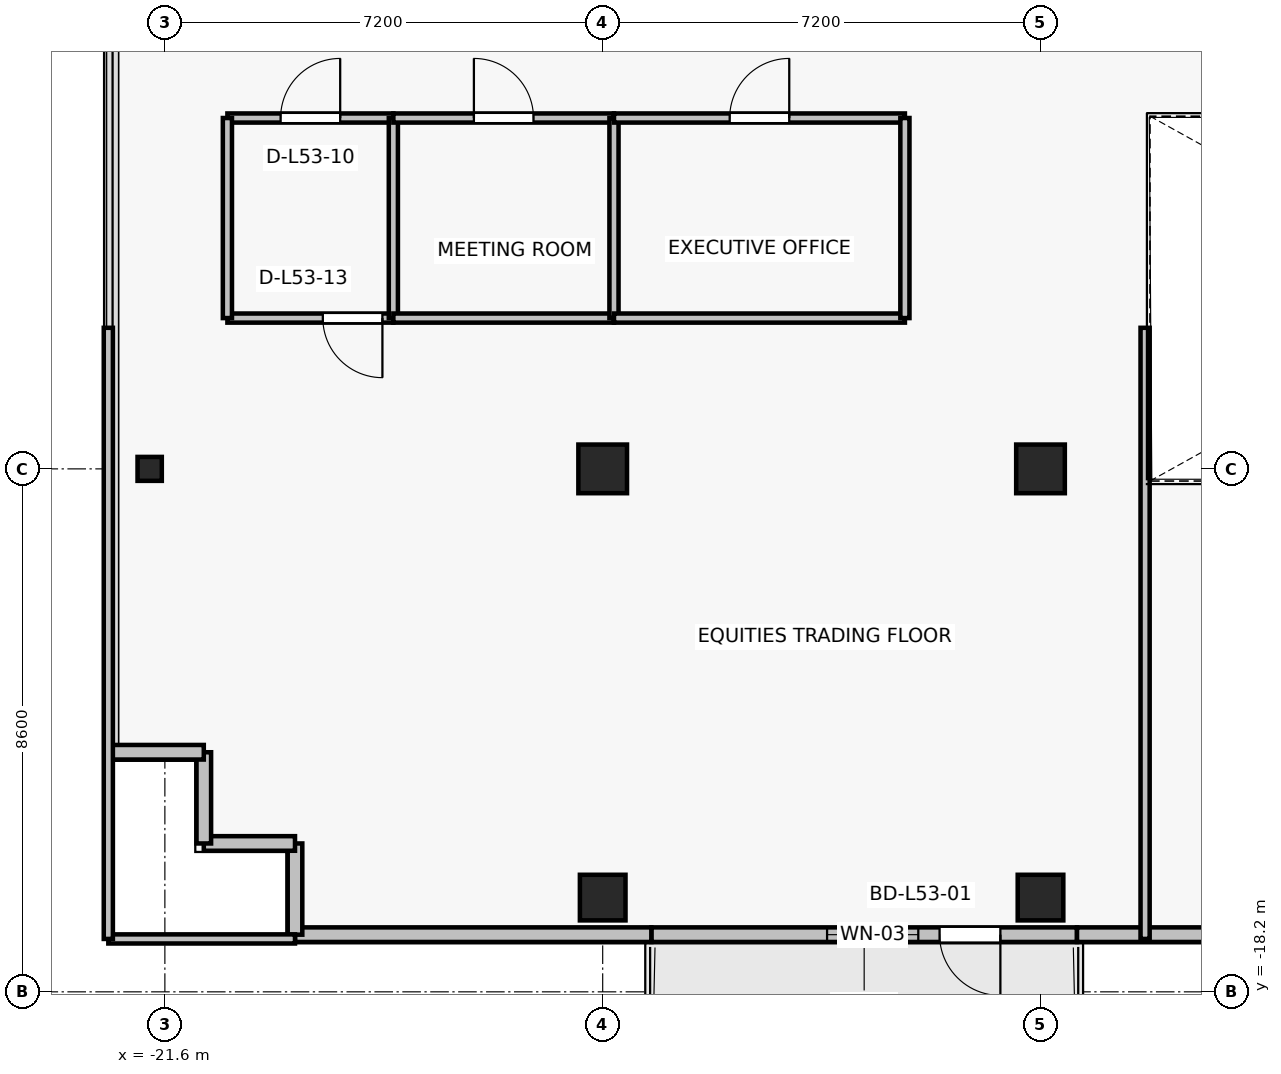
"""IFC4 building model, lengths in metres.
Left out: names, types, materials, properties, quantities, classifications, styles, units other than length and angle.
Written with IfcOpenShell. Run it as: python <this file> out.ifc"""

import sys

from ifc_helpers import new_model, si_unit, direction, frame, frame_2d, origin, origin_2d, place, context, subcontext, project, spatial, rectangle, i_section, extrude, source, transform, mapped, element, fill, save


model = new_model("IFC4")
c1 = context("Model", 3, precision=1e-05, world=origin(), true_north=direction((0.0, 1.0)))
c2 = subcontext(c1, "Body", "Model", "MODEL_VIEW")
j1 = project(units=[si_unit("LENGTHUNIT", "METRE"), si_unit("PLANEANGLEUNIT", "RADIAN")], contexts=[c1])
p1 = place(None, origin())
s1 = spatial("IfcSite", under=j1, at=p1, CompositionType="ELEMENT")
p2 = place(p1, origin())
s2 = spatial("IfcBuilding", under=s1, at=p2, CompositionType="ELEMENT")
p3 = place(p2, frame((0.0, 0.0, 189.1)))
s3 = spatial("IfcBuildingStorey", under=s2, at=p3, CompositionType="ELEMENT", Elevation=189.1)
for number, where, z_axis, x_axis in (
    (1, (-14.4, -9.6, 0.0), (0.0, 0.0, 1.0), (1.0, 0.0, 0.0)),
    (2, (-7.2, -9.6, 0.0), (0.0, 0.0, 1.0), (1.0, 0.0, 0.0)),
):
    element("IfcColumn", number, at=place(p3, frame(where, z_axis=z_axis, x_axis=x_axis)), inside=s3, PredefinedType="COLUMN", context=c2, shape_type="SweptSolid", body=[
        extrude(rectangle(XDim=0.8, YDim=0.8, at=origin_2d()), origin(), (0.0, 0.0, 1.0), 3.3),
    ])
for number, where, z_axis, x_axis in (
    (3, (-14.4, -16.65, 0.0), (0.0, 0.0, 1.0), (1.0, 0.0, 0.0)),
    (4, (-7.2, -16.65, 0.0), (0.0, 0.0, 1.0), (1.0, 0.0, 0.0)),
):
    element("IfcColumn", number, at=place(p3, frame(where, z_axis=z_axis, x_axis=x_axis)), inside=s3, PredefinedType="COLUMN", context=c2, shape_type="SweptSolid", body=[
        extrude(rectangle(XDim=0.75, YDim=0.75, at=origin_2d()), origin(), (0.0, 0.0, 1.0), 3.3),
    ])
p4 = place(p3, frame((-21.85, -9.6, 0.0), z_axis=(0.0, 0.0, 1.0), x_axis=(1.0, 0.0, 0.0)))
e5 = element("IfcColumn", 5, at=p4, inside=s3, PredefinedType="COLUMN", context=c2, shape_type="SweptSolid", body=[
    extrude(i_section(OverallWidth=0.399, OverallDepth=0.394, WebThickness=0.023, FlangeThickness=0.037, FilletRadius=0.015, at=origin_2d()), origin(), (0.0, 0.0, 1.0), 3.3),
])
p5 = place(p3, frame((-6.6, -17.26, 0.0), z_axis=(0.0, 0.0, 1.0), x_axis=(-1.0, 0.0, 0.0)))
e6 = element("IfcWall", 6, at=p5, inside=s3, PredefinedType="SOLIDWALL", context=c2, shape_type="SweptSolid", body=[
    extrude(rectangle(XDim=7.0, YDim=0.24, at=frame_2d((3.5, 0.0))), origin(), (0.0, 0.0, 1.0), 2.665),
])
p6 = place(p5, frame((1.26, 0.0, 0.0)))
e7 = element("IfcOpeningElement", 7, at=p6, cuts=e6, PredefinedType="OPENING", context=c2, shape_type="SweptSolid", body=[
    extrude(rectangle(XDim=1.0, YDim=2.2, at=frame_2d((0.5, 1.1))), frame((0.0, 0.13, 0.0), z_axis=(0.0, -1.0, 0.0), x_axis=(1.0, 0.0, 0.0)), (0.0, 0.0, 1.0), 0.26),
])
p7 = place(p5, frame((2.61, 0.0, 0.85)))
e8 = element("IfcOpeningElement", 8, at=p7, cuts=e6, PredefinedType="OPENING", context=c2, shape_type="SweptSolid", body=[
    extrude(rectangle(XDim=1.5, YDim=1.6, at=frame_2d((0.75, 0.8))), frame((0.0, 0.13, 0.0), z_axis=(0.0, -1.0, 0.0), x_axis=(1.0, 0.0, 0.0)), (0.0, 0.0, 1.0), 0.26),
])
p8 = place(p3, frame((-6.6, -17.26, 0.0), z_axis=(0.0, 0.0, 1.0), x_axis=(1.0, 0.0, 0.0)))
e9 = element("IfcWall", 9, at=p8, inside=s3, PredefinedType="SOLIDWALL", context=c2, shape_type="SweptSolid", body=[
    extrude(rectangle(XDim=3.4, YDim=0.24, at=frame_2d((1.7, 0.0))), origin(), (0.0, 0.0, 1.0), 3.075),
])
p9 = place(p3, frame((-19.46, -17.26, 0.0), z_axis=(0.0, 0.0, 1.0), x_axis=(1.0, 0.0, 0.0)))
e10 = element("IfcWall", 10, at=p9, inside=s3, PredefinedType="SOLIDWALL", context=c2, shape_type="SweptSolid", body=[
    extrude(rectangle(XDim=5.86, YDim=0.24, at=frame_2d((2.93, 0.0))), origin(), (0.0, 0.0, 1.0), 2.665),
])
for number, where, z_axis, x_axis in (
    (11, (-19.46, -15.76, 0.0), (0.0, 0.0, 1.0), (0.0, -1.0, 0.0)),
    (12, (-20.96, -15.76, 0.0), (0.0, 0.0, 1.0), (1.0, 0.0, 0.0)),
    (13, (-20.96, -14.26, 0.0), (0.0, 0.0, 1.0), (0.0, -1.0, 0.0)),
    (14, (-22.46, -14.26, 0.0), (0.0, 0.0, 1.0), (1.0, 0.0, 0.0)),
):
    element("IfcWall", number, at=place(p3, frame(where, z_axis=z_axis, x_axis=x_axis)), inside=s3, PredefinedType="SOLIDWALL", context=c2, shape_type="SweptSolid", body=[
        extrude(rectangle(XDim=1.5, YDim=0.24, at=frame_2d((0.75, 0.0))), origin(), (0.0, 0.0, 1.0), 3.075),
    ])
p10 = place(p3, frame((-17.843, -7.12, 0.0), z_axis=(0.0, 0.0, 1.0), x_axis=(-1.0, 0.0, 0.0)))
e15 = element("IfcWall", 15, at=p10, inside=s3, PredefinedType="PARTITIONING", context=c2, shape_type="SweptSolid", body=[
    extrude(rectangle(XDim=2.729, YDim=0.15, at=frame_2d((1.365, 0.0))), origin(), (0.0, 0.0, 1.0), 3.075),
])
p11 = place(p10, frame((0.18, 0.0, 0.0)))
e16 = element("IfcOpeningElement", 16, at=p11, cuts=e15, PredefinedType="OPENING", context=c2, shape_type="SweptSolid", body=[
    extrude(rectangle(XDim=0.98, YDim=2.15, at=frame_2d((0.49, 1.075))), frame((0.0, 0.085, 0.0), z_axis=(0.0, -1.0, 0.0), x_axis=(1.0, 0.0, 0.0)), (0.0, 0.0, 1.0), 0.17),
])
p12 = place(p3, frame((-20.572, -3.83, 0.0), z_axis=(0.0, 0.0, 1.0), x_axis=(1.0, 0.0, 0.0)))
e17 = element("IfcWall", 17, at=p12, inside=s3, PredefinedType="PARTITIONING", context=c2, shape_type="SweptSolid", body=[
    extrude(rectangle(XDim=2.729, YDim=0.15, at=frame_2d((1.365, 0.0))), origin(), (0.0, 0.0, 1.0), 3.075),
])
p13 = place(p12, frame((0.875, 0.0, 0.0)))
e18 = element("IfcOpeningElement", 18, at=p13, cuts=e17, PredefinedType="OPENING", context=c2, shape_type="SweptSolid", body=[
    extrude(rectangle(XDim=0.98, YDim=2.15, at=frame_2d((0.49, 1.075))), frame((0.0, 0.085, 0.0), z_axis=(0.0, -1.0, 0.0), x_axis=(1.0, 0.0, 0.0)), (0.0, 0.0, 1.0), 0.17),
])
for number, where, z_axis, x_axis in (
    (19, (-20.572, -7.12, 0.0), (0.0, 0.0, 1.0), (0.0, 1.0, 0.0)),
    (20, (-17.843, -3.83, 0.0), (0.0, 0.0, 1.0), (0.0, -1.0, 0.0)),
):
    element("IfcWall", number, at=place(p3, frame(where, z_axis=z_axis, x_axis=x_axis)), inside=s3, PredefinedType="PARTITIONING", context=c2, shape_type="SweptSolid", body=[
        extrude(rectangle(XDim=3.29, YDim=0.15, at=frame_2d((1.645, 0.0))), origin(), (0.0, 0.0, 1.0), 2.665),
    ])
p14 = place(p3, frame((-14.214, -7.12, 0.0), z_axis=(0.0, 0.0, 1.0), x_axis=(-1.0, 0.0, 0.0)))
e21 = element("IfcWall", 21, at=p14, inside=s3, PredefinedType="PARTITIONING", context=c2, shape_type="SweptSolid", body=[
    extrude(rectangle(XDim=3.628, YDim=0.15, at=frame_2d((1.814, 0.0))), origin(), (0.0, 0.0, 1.0), 2.565),
])
p15 = place(p3, frame((-17.843, -3.83, 0.0), z_axis=(0.0, 0.0, 1.0), x_axis=(1.0, 0.0, 0.0)))
e22 = element("IfcWall", 22, at=p15, inside=s3, PredefinedType="PARTITIONING", context=c2, shape_type="SweptSolid", body=[
    extrude(rectangle(XDim=3.628, YDim=0.15, at=frame_2d((1.814, 0.0))), origin(), (0.0, 0.0, 1.0), 2.565),
])
p16 = place(p15, frame((1.324, 0.0, 0.0)))
e23 = element("IfcOpeningElement", 23, at=p16, cuts=e22, PredefinedType="OPENING", context=c2, shape_type="SweptSolid", body=[
    extrude(rectangle(XDim=0.98, YDim=2.15, at=frame_2d((0.49, 1.075))), frame((0.0, 0.085, 0.0), z_axis=(0.0, -1.0, 0.0), x_axis=(1.0, 0.0, 0.0)), (0.0, 0.0, 1.0), 0.17),
])
p17 = place(p3, frame((-14.214, -3.83, 0.0), z_axis=(0.0, 0.0, 1.0), x_axis=(0.0, -1.0, 0.0)))
e24 = element("IfcWall", 24, at=p17, inside=s3, PredefinedType="PARTITIONING", context=c2, shape_type="SweptSolid", body=[
    extrude(rectangle(XDim=3.29, YDim=0.15, at=frame_2d((1.645, 0.0))), origin(), (0.0, 0.0, 1.0), 2.565),
])
p18 = place(p3, frame((-9.43, -7.12, 0.0), z_axis=(0.0, 0.0, 1.0), x_axis=(-1.0, 0.0, 0.0)))
e25 = element("IfcWall", 25, at=p18, inside=s3, PredefinedType="PARTITIONING", context=c2, shape_type="SweptSolid", body=[
    extrude(rectangle(XDim=4.784, YDim=0.15, at=frame_2d((2.392, 0.0))), origin(), (0.0, 0.0, 1.0), 2.565),
])
p19 = place(p3, frame((-14.214, -3.83, 0.0), z_axis=(0.0, 0.0, 1.0), x_axis=(1.0, 0.0, 0.0)))
e26 = element("IfcWall", 26, at=p19, inside=s3, PredefinedType="PARTITIONING", context=c2, shape_type="SweptSolid", body=[
    extrude(rectangle(XDim=4.784, YDim=0.15, at=frame_2d((2.392, 0.0))), origin(), (0.0, 0.0, 1.0), 2.565),
])
p20 = place(p19, frame((1.902, 0.0, 0.0)))
e27 = element("IfcOpeningElement", 27, at=p20, cuts=e26, PredefinedType="OPENING", context=c2, shape_type="SweptSolid", body=[
    extrude(rectangle(XDim=0.98, YDim=2.15, at=frame_2d((0.49, 1.075))), frame((0.0, 0.085, 0.0), z_axis=(0.0, -1.0, 0.0), x_axis=(1.0, 0.0, 0.0)), (0.0, 0.0, 1.0), 0.17),
])
p21 = place(p3, frame((-9.43, -3.83, 0.0), z_axis=(0.0, 0.0, 1.0), x_axis=(0.0, -1.0, 0.0)))
e28 = element("IfcWall", 28, at=p21, inside=s3, PredefinedType="PARTITIONING", context=c2, shape_type="SweptSolid", body=[
    extrude(rectangle(XDim=3.29, YDim=0.15, at=frame_2d((1.645, 0.0))), origin(), (0.0, 0.0, 1.0), 2.665),
])
p22 = place(p3, frame((-19.46, -17.33, 0.0), z_axis=(0.0, 0.0, 1.0), x_axis=(-1.0, 0.0, 0.0)))
e29 = element("IfcWall", 29, at=p22, inside=s3, PredefinedType="PARTITIONING", context=c2, shape_type="SweptSolid", body=[
    extrude(rectangle(XDim=3.07, YDim=0.15, at=frame_2d((1.535, 0.0))), origin(), (0.0, 0.0, 1.0), 2.665),
])
p23 = place(p3, frame((-22.53, -17.33, 0.0), z_axis=(0.0, 0.0, 1.0), x_axis=(0.0, 1.0, 0.0)))
e30 = element("IfcWall", 30, at=p23, inside=s3, PredefinedType="PARTITIONING", context=c2, shape_type="SweptSolid", body=[
    extrude(rectangle(XDim=10.05, YDim=0.15, at=frame_2d((5.025, 0.0))), origin(), (0.0, 0.0, 1.0), 2.665),
])
p24 = place(p3, frame((-5.48, -7.28, 0.0), z_axis=(0.0, 0.0, 1.0), x_axis=(0.0, -1.0, 0.0)))
e31 = element("IfcWall", 31, at=p24, inside=s3, PredefinedType="PARTITIONING", context=c2, shape_type="SweptSolid", body=[
    extrude(rectangle(XDim=10.05, YDim=0.15, at=frame_2d((5.025, 0.0))), origin(), (0.0, 0.0, 1.0), 2.565),
])
m1 = source(origin(), c2, "Body", "SweptSolid", [
    extrude(rectangle(XDim=1.0, YDim=2.2, at=frame_2d((0.5, 1.1))), frame((0.0, 0.025, 0.0), z_axis=(0.0, -1.0, 0.0), x_axis=(1.0, 0.0, 0.0)), (0.0, 0.0, 1.0), 0.05),
])
p25 = place(p6, origin())
e32 = element("IfcDoor", 32, at=p25, inside=s3, OperationType="SINGLE_SWING_LEFT", PredefinedType="DOOR", context=c2, shape_type="MappedRepresentation", body=[
    mapped(m1, transform((0.0, 0.0, 0.0), x_axis=(1.0, 0.0, 0.0), y_axis=(0.0, 1.0, 0.0), z_axis=(0.0, 0.0, 1.0), scale=1.0)),
])
fill(e7, e32)
m2 = source(origin(), c2, "Body", "SweptSolid", [
    extrude(rectangle(XDim=1.5, YDim=1.6, at=frame_2d((0.75, 0.8))), frame((0.0, 0.03, 0.0), z_axis=(0.0, -1.0, 0.0), x_axis=(1.0, 0.0, 0.0)), (0.0, 0.0, 1.0), 0.06),
])
p26 = place(p7, origin())
e33 = element("IfcWindow", 33, at=p26, inside=s3, PartitioningType="SINGLE_PANEL", PredefinedType="WINDOW", context=c2, shape_type="MappedRepresentation", body=[
    mapped(m2, transform((0.0, 0.0, 0.0), x_axis=(1.0, 0.0, 0.0), y_axis=(0.0, 1.0, 0.0), z_axis=(0.0, 0.0, 1.0), scale=1.0)),
])
fill(e8, e33)
m3 = source(origin(), c2, "Body", "SweptSolid", [
    extrude(rectangle(XDim=0.98, YDim=2.15, at=frame_2d((0.49, 1.075))), frame((0.0, 0.025, 0.0), z_axis=(0.0, -1.0, 0.0), x_axis=(1.0, 0.0, 0.0)), (0.0, 0.0, 1.0), 0.05),
])
p27 = place(p13, origin())
e34 = element("IfcDoor", 34, at=p27, inside=s3, OperationType="SINGLE_SWING_RIGHT", PredefinedType="DOOR", context=c2, shape_type="MappedRepresentation", body=[
    mapped(m3, transform((0.0, 0.0, 0.0), x_axis=(1.0, 0.0, 0.0), y_axis=(0.0, 1.0, 0.0), z_axis=(0.0, 0.0, 1.0), scale=1.0)),
])
fill(e18, e34)
p28 = place(p16, origin())
e35 = element("IfcDoor", 35, at=p28, inside=s3, OperationType="SINGLE_SWING_LEFT", PredefinedType="DOOR", context=c2, shape_type="MappedRepresentation", body=[
    mapped(m3, transform((0.0, 0.0, 0.0), x_axis=(1.0, 0.0, 0.0), y_axis=(0.0, 1.0, 0.0), z_axis=(0.0, 0.0, 1.0), scale=1.0)),
])
fill(e23, e35)
p29 = place(p20, origin())
e36 = element("IfcDoor", 36, at=p29, inside=s3, OperationType="SINGLE_SWING_RIGHT", PredefinedType="DOOR", context=c2, shape_type="MappedRepresentation", body=[
    mapped(m3, transform((0.0, 0.0, 0.0), x_axis=(1.0, 0.0, 0.0), y_axis=(0.0, 1.0, 0.0), z_axis=(0.0, 0.0, 1.0), scale=1.0)),
])
fill(e27, e36)
p30 = place(p11, origin())
e37 = element("IfcDoor", 37, at=p30, inside=s3, OperationType="SINGLE_SWING_LEFT", PredefinedType="DOOR", context=c2, shape_type="MappedRepresentation", body=[
    mapped(m3, transform((0.0, 0.0, 0.0), x_axis=(1.0, 0.0, 0.0), y_axis=(0.0, 1.0, 0.0), z_axis=(0.0, 0.0, 1.0), scale=1.0)),
])
fill(e16, e37)
save(model, sys.argv[1])
